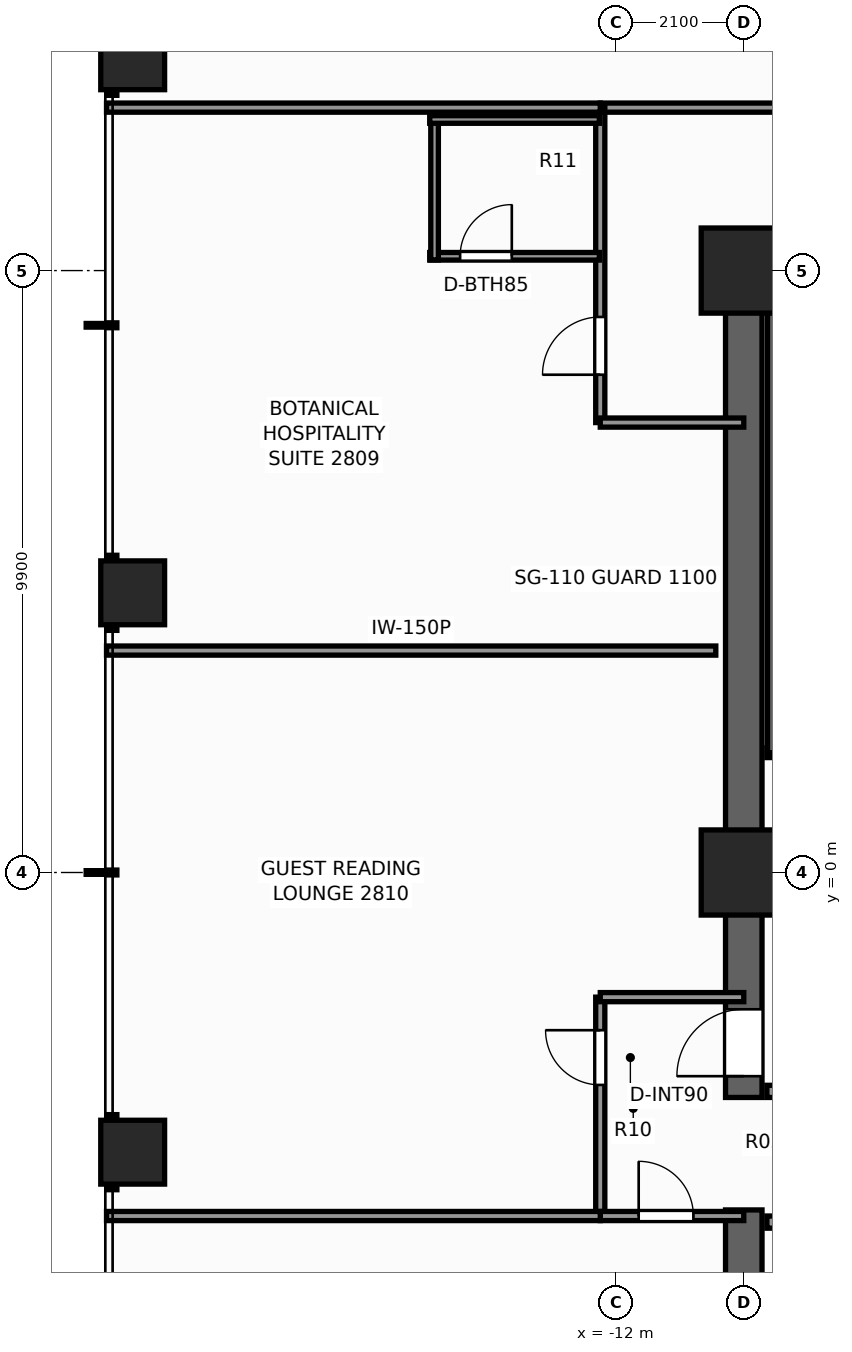
"""IFC4 building model, lengths in metres.
Left out: names, types, materials, properties, quantities, classifications, styles, units other than length and angle.
Written with IfcOpenShell. Run it as: python <this file> out.ifc"""

import sys

from ifc_helpers import new_model, si_unit, direction, frame, frame_2d, origin, origin_2d, place, context, subcontext, project, spatial, rectangle, extrude, element, fill, save


model = new_model("IFC4")
c1 = context("Model", 3, precision=1e-05, world=origin(), true_north=direction((0.0, 1.0)))
c2 = subcontext(c1, "Body", "Model", "MODEL_VIEW")
j1 = project(units=[si_unit("LENGTHUNIT", "METRE"), si_unit("PLANEANGLEUNIT", "RADIAN")], contexts=[c1])
p1 = place(None, origin())
s1 = spatial("IfcSite", under=j1, at=p1, CompositionType="ELEMENT")
p2 = place(p1, origin())
s2 = spatial("IfcBuilding", under=s1, at=p2, CompositionType="ELEMENT")
p3 = place(p2, frame((0.0, 0.0, 98.6)))
s3 = spatial("IfcBuildingStorey", under=s2, at=p3, CompositionType="ELEMENT", Elevation=98.6)
p4 = place(p3, frame((-10.2, 9.9, 0.0), z_axis=(0.0, 0.0, 1.0), x_axis=(1.0, 0.0, 0.0)))
e1 = element("IfcWall", 1, at=p4, inside=s3, PredefinedType="SHEAR", context=c2, shape_type="SweptSolid", body=[
    extrude(rectangle(XDim=14.62, YDim=0.6, at=frame_2d((7.31, 0.0))), origin(), (0.0, 0.0, 1.0), 3.3),
])
p5 = place(p3, frame((-9.9, -9.6, 0.0), z_axis=(0.0, 0.0, 1.0), x_axis=(0.0, 1.0, 0.0)))
e2 = element("IfcWall", 2, at=p5, inside=s3, PredefinedType="SHEAR", context=c2, shape_type="SweptSolid", body=[
    extrude(rectangle(XDim=4.05, YDim=0.6, at=frame_2d((2.025, 0.0))), origin(), (0.0, 0.0, 1.0), 3.3),
])
p6 = place(p3, frame((-9.9, -3.7, 0.0), z_axis=(0.0, 0.0, 1.0), x_axis=(0.0, 1.0, 0.0)))
e3 = element("IfcWall", 3, at=p6, inside=s3, PredefinedType="SHEAR", context=c2, shape_type="SweptSolid", body=[
    extrude(rectangle(XDim=13.3, YDim=0.6, at=frame_2d((6.65, 0.0))), origin(), (0.0, 0.0, 1.0), 3.3),
])
p7 = place(p6, frame((0.35, 0.0, 0.0)))
e4 = element("IfcOpeningElement", 4, at=p7, cuts=e3, PredefinedType="OPENING", context=c2, shape_type="SweptSolid", body=[
    extrude(rectangle(XDim=1.1, YDim=2.2, at=frame_2d((0.55, 1.1))), frame((0.0, 0.31, 0.0), z_axis=(0.0, -1.0, 0.0), x_axis=(1.0, 0.0, 0.0)), (0.0, 0.0, 1.0), 0.62),
])
for number, where, z_axis, x_axis in (
    (5, (-9.9, 9.9, 0.0), (0.0, 0.0, 1.0), (1.0, 0.0, 0.0)),
    (6, (-9.9, 0.0, 0.0), (0.0, 0.0, 1.0), (1.0, 0.0, 0.0)),
):
    element("IfcColumn", number, at=place(p3, frame(where, z_axis=z_axis, x_axis=x_axis)), inside=s3, PredefinedType="COLUMN", context=c2, shape_type="SweptSolid", body=[
        extrude(rectangle(XDim=1.4, YDim=1.4, at=origin_2d()), origin(), (0.0, 0.0, 1.0), 3.3),
    ])
for number, where, z_axis, x_axis in (
    (7, (-19.95, -4.6, 0.0), (0.0, 0.0, 1.0), (1.0, 0.0, 0.0)),
    (8, (-19.95, 4.6, 0.0), (0.0, 0.0, 1.0), (1.0, 0.0, 0.0)),
    (9, (-19.95, 13.4, 0.0), (0.0, 0.0, 1.0), (1.0, 0.0, 0.0)),
):
    element("IfcColumn", number, at=place(p3, frame(where, z_axis=z_axis, x_axis=x_axis)), inside=s3, PredefinedType="COLUMN", context=c2, shape_type="SweptSolid", body=[
        extrude(rectangle(XDim=1.05, YDim=1.05, at=origin_2d()), origin(), (0.0, 0.0, 1.0), 3.3),
    ])
p8 = place(p3, frame((-9.52, 1.97, 0.0), z_axis=(0.0, 0.0, 1.0), x_axis=(1.0, 0.0, 0.0)))
e10 = element("IfcWall", 10, at=p8, inside=s3, PredefinedType="SHEAR", context=c2, shape_type="SweptSolid", body=[
    extrude(rectangle(XDim=3.52, YDim=0.16, at=frame_2d((1.76, 0.0))), origin(), (0.0, 0.0, 1.0), 3.3),
])
p9 = place(p8, frame((1.15, 0.0, 0.0)))
e11 = element("IfcOpeningElement", 11, at=p9, cuts=e10, PredefinedType="OPENING", context=c2, shape_type="SweptSolid", body=[
    extrude(rectangle(XDim=1.1, YDim=2.2, at=frame_2d((0.55, 1.1))), frame((0.0, 0.09, 0.0), z_axis=(0.0, -1.0, 0.0), x_axis=(1.0, 0.0, 0.0)), (0.0, 0.0, 1.0), 0.18),
])
p10 = place(p3, frame((-9.52, 9.53, 0.0), z_axis=(0.0, 0.0, 1.0), x_axis=(1.0, 0.0, 0.0)))
e12 = element("IfcWall", 12, at=p10, inside=s3, PredefinedType="SHEAR", context=c2, shape_type="SweptSolid", body=[
    extrude(rectangle(XDim=3.52, YDim=0.16, at=frame_2d((1.76, 0.0))), origin(), (0.0, 0.0, 1.0), 3.3),
])
p11 = place(p3, frame((-9.43, 1.97, 0.0), z_axis=(0.0, 0.0, 1.0), x_axis=(0.0, 1.0, 0.0)))
e13 = element("IfcWall", 13, at=p11, inside=s3, PredefinedType="SHEAR", context=c2, shape_type="SweptSolid", body=[
    extrude(rectangle(XDim=7.56, YDim=0.16, at=frame_2d((3.78, 0.0))), origin(), (0.0, 0.0, 1.0), 3.3),
])
p12 = place(p3, frame((-9.52, -3.6, 0.0), z_axis=(0.0, 0.0, 1.0), x_axis=(1.0, 0.0, 0.0)))
e14 = element("IfcWall", 14, at=p12, inside=s3, PredefinedType="SOLIDWALL", context=c2, shape_type="SweptSolid", body=[
    extrude(rectangle(XDim=3.77, YDim=0.2, at=frame_2d((1.885, 0.0))), origin(), (0.0, 0.0, 1.0), 3.08),
])
p13 = place(p12, frame((1.15, 0.0, 0.0)))
e15 = element("IfcOpeningElement", 15, at=p13, cuts=e14, PredefinedType="OPENING", context=c2, shape_type="SweptSolid", body=[
    extrude(rectangle(XDim=0.95, YDim=2.06, at=frame_2d((0.475, 1.03))), frame((0.0, 0.11, 0.0), z_axis=(0.0, -1.0, 0.0), x_axis=(1.0, 0.0, 0.0)), (0.0, 0.0, 1.0), 0.22),
])
p14 = place(p3, frame((-9.52, -5.75, 0.0), z_axis=(0.0, 0.0, 1.0), x_axis=(1.0, 0.0, 0.0)))
e16 = element("IfcWall", 16, at=p14, inside=s3, PredefinedType="SOLIDWALL", context=c2, shape_type="SweptSolid", body=[
    extrude(rectangle(XDim=5.66, YDim=0.2, at=frame_2d((2.83, 0.0))), origin(), (0.0, 0.0, 1.0), 3.08),
])
p15 = place(p14, frame((0.55, 0.0, 0.0)))
e17 = element("IfcOpeningElement", 17, at=p15, cuts=e16, PredefinedType="OPENING", context=c2, shape_type="SweptSolid", body=[
    extrude(rectangle(XDim=1.1, YDim=2.2, at=frame_2d((0.55, 1.1))), frame((0.0, 0.11, 0.0), z_axis=(0.0, -1.0, 0.0), x_axis=(1.0, 0.0, 0.0)), (0.0, 0.0, 1.0), 0.22),
])
p16 = place(p14, frame((2.48, 0.0, 0.0)))
e18 = element("IfcOpeningElement", 18, at=p16, cuts=e16, PredefinedType="OPENING", context=c2, shape_type="SweptSolid", body=[
    extrude(rectangle(XDim=1.1, YDim=2.2, at=frame_2d((0.55, 1.1))), frame((0.0, 0.11, 0.0), z_axis=(0.0, -1.0, 0.0), x_axis=(1.0, 0.0, 0.0)), (0.0, 0.0, 1.0), 0.22),
])
p17 = place(p14, frame((4.41, 0.0, 0.0)))
e19 = element("IfcOpeningElement", 19, at=p17, cuts=e16, PredefinedType="OPENING", context=c2, shape_type="SweptSolid", body=[
    extrude(rectangle(XDim=1.1, YDim=2.2, at=frame_2d((0.55, 1.1))), frame((0.0, 0.11, 0.0), z_axis=(0.0, -1.0, 0.0), x_axis=(1.0, 0.0, 0.0)), (0.0, 0.0, 1.0), 0.22),
])
p18 = place(p3, frame((-12.26, 12.58, 0.0), z_axis=(0.0, 0.0, 1.0), x_axis=(1.0, 0.0, 0.0)))
e20 = element("IfcWall", 20, at=p18, inside=s3, PredefinedType="PARTITIONING", context=c2, shape_type="SweptSolid", body=[
    extrude(rectangle(XDim=24.52, YDim=0.15, at=frame_2d((12.26, 0.0))), origin(), (0.0, 0.0, 1.0), 2.292),
])
p19 = place(p18, frame((4.275, 0.0, 0.0)))
e21 = element("IfcOpeningElement", 21, at=p19, cuts=e20, PredefinedType="OPENING", context=c2, shape_type="SweptSolid", body=[
    extrude(rectangle(XDim=0.9, YDim=2.06, at=frame_2d((0.45, 1.03))), frame((0.0, 0.085, 0.0), z_axis=(0.0, -1.0, 0.0), x_axis=(1.0, 0.0, 0.0)), (0.0, 0.0, 1.0), 0.17),
])
p20 = place(p18, frame((13.84, 0.0, 0.0)))
e22 = element("IfcOpeningElement", 22, at=p20, cuts=e20, PredefinedType="OPENING", context=c2, shape_type="SweptSolid", body=[
    extrude(rectangle(XDim=0.9, YDim=2.06, at=frame_2d((0.45, 1.03))), frame((0.0, 0.085, 0.0), z_axis=(0.0, -1.0, 0.0), x_axis=(1.0, 0.0, 0.0)), (0.0, 0.0, 1.0), 0.17),
])
p21 = place(p18, frame((19.345, 0.0, 0.0)))
e23 = element("IfcOpeningElement", 23, at=p21, cuts=e20, PredefinedType="OPENING", context=c2, shape_type="SweptSolid", body=[
    extrude(rectangle(XDim=0.9, YDim=2.06, at=frame_2d((0.45, 1.03))), frame((0.0, 0.085, 0.0), z_axis=(0.0, -1.0, 0.0), x_axis=(1.0, 0.0, 0.0)), (0.0, 0.0, 1.0), 0.17),
])
p22 = place(p3, frame((-12.26, 7.4, 0.0), z_axis=(0.0, 0.0, 1.0), x_axis=(0.0, 1.0, 0.0)))
e24 = element("IfcWall", 24, at=p22, inside=s3, PredefinedType="PARTITIONING", context=c2, shape_type="SweptSolid", body=[
    extrude(rectangle(XDim=5.18, YDim=0.15, at=frame_2d((2.59, 0.0))), origin(), (0.0, 0.0, 1.0), 2.292),
])
p23 = place(p22, frame((0.787, 0.0, 0.0)))
e25 = element("IfcOpeningElement", 25, at=p23, cuts=e24, PredefinedType="OPENING", context=c2, shape_type="SweptSolid", body=[
    extrude(rectangle(XDim=0.95, YDim=2.06, at=frame_2d((0.475, 1.03))), frame((0.0, 0.085, 0.0), z_axis=(0.0, -1.0, 0.0), x_axis=(1.0, 0.0, 0.0)), (0.0, 0.0, 1.0), 0.17),
])
p24 = place(p3, frame((-12.26, 7.4, 0.0), z_axis=(0.0, 0.0, 1.0), x_axis=(1.0, 0.0, 0.0)))
e26 = element("IfcWall", 26, at=p24, inside=s3, PredefinedType="PARTITIONING", context=c2, shape_type="SweptSolid", body=[
    extrude(rectangle(XDim=2.36, YDim=0.15, at=frame_2d((1.18, 0.0))), origin(), (0.0, 0.0, 1.0), 3.08),
])
p25 = place(p3, frame((-12.26, -5.65, 0.0), z_axis=(0.0, 0.0, 1.0), x_axis=(0.0, 1.0, 0.0)))
e27 = element("IfcWall", 27, at=p25, inside=s3, PredefinedType="PARTITIONING", context=c2, shape_type="SweptSolid", body=[
    extrude(rectangle(XDim=3.6, YDim=0.15, at=frame_2d((1.8, 0.0))), origin(), (0.0, 0.0, 1.0), 2.292),
])
p26 = place(p25, frame((2.156, 0.0, 0.0)))
e28 = element("IfcOpeningElement", 28, at=p26, cuts=e27, PredefinedType="OPENING", context=c2, shape_type="SweptSolid", body=[
    extrude(rectangle(XDim=0.9, YDim=2.06, at=frame_2d((0.45, 1.03))), frame((0.0, 0.085, 0.0), z_axis=(0.0, -1.0, 0.0), x_axis=(1.0, 0.0, 0.0)), (0.0, 0.0, 1.0), 0.17),
])
p27 = place(p3, frame((-12.26, -2.05, 0.0), z_axis=(0.0, 0.0, 1.0), x_axis=(1.0, 0.0, 0.0)))
e29 = element("IfcWall", 29, at=p27, inside=s3, PredefinedType="PARTITIONING", context=c2, shape_type="SweptSolid", body=[
    extrude(rectangle(XDim=2.36, YDim=0.15, at=frame_2d((1.18, 0.0))), origin(), (0.0, 0.0, 1.0), 3.08),
])
p28 = place(p3, frame((-12.26, -5.65, 0.0), z_axis=(0.0, 0.0, 1.0), x_axis=(1.0, 0.0, 0.0)))
e30 = element("IfcWall", 30, at=p28, inside=s3, PredefinedType="PARTITIONING", context=c2, shape_type="SweptSolid", body=[
    extrude(rectangle(XDim=2.36, YDim=0.15, at=frame_2d((1.18, 0.0))), origin(), (0.0, 0.0, 1.0), 3.08),
])
p29 = place(p28, frame((0.632, 0.0, 0.0)))
e31 = element("IfcOpeningElement", 31, at=p29, cuts=e30, PredefinedType="OPENING", context=c2, shape_type="SweptSolid", body=[
    extrude(rectangle(XDim=0.9, YDim=2.06, at=frame_2d((0.45, 1.03))), frame((0.0, 0.085, 0.0), z_axis=(0.0, -1.0, 0.0), x_axis=(1.0, 0.0, 0.0)), (0.0, 0.0, 1.0), 0.17),
])
p30 = place(p3, frame((-20.38, 12.58, 0.0), z_axis=(0.0, 0.0, 1.0), x_axis=(1.0, 0.0, 0.0)))
e32 = element("IfcWall", 32, at=p30, inside=s3, PredefinedType="PARTITIONING", context=c2, shape_type="SweptSolid", body=[
    extrude(rectangle(XDim=8.12, YDim=0.15, at=frame_2d((4.06, 0.0))), origin(), (0.0, 0.0, 1.0), 2.292),
])
p31 = place(p3, frame((-20.38, 3.65, 0.0), z_axis=(0.0, 0.0, 1.0), x_axis=(1.0, 0.0, 0.0)))
e33 = element("IfcWall", 33, at=p31, inside=s3, PredefinedType="PARTITIONING", context=c2, shape_type="SweptSolid", body=[
    extrude(rectangle(XDim=10.02, YDim=0.15, at=frame_2d((5.01, 0.0))), origin(), (0.0, 0.0, 1.0), 2.449),
])
p32 = place(p3, frame((-20.38, -5.65, 0.0), z_axis=(0.0, 0.0, 1.0), x_axis=(1.0, 0.0, 0.0)))
e34 = element("IfcWall", 34, at=p32, inside=s3, PredefinedType="PARTITIONING", context=c2, shape_type="SweptSolid", body=[
    extrude(rectangle(XDim=8.12, YDim=0.15, at=frame_2d((4.06, 0.0))), origin(), (0.0, 0.0, 1.0), 2.449),
])
p33 = place(p3, frame((-15.065, 10.135, 0.0), z_axis=(0.0, 0.0, 1.0), x_axis=(1.0, 0.0, 0.0)))
e35 = element("IfcWall", 35, at=p33, inside=s3, PredefinedType="PARTITIONING", context=c2, shape_type="SweptSolid", body=[
    extrude(rectangle(XDim=2.79, YDim=0.125, at=frame_2d((1.395, 0.0))), origin(), (0.0, 0.0, 1.0), 3.08),
])
p34 = place(p33, frame((0.5, 0.0, 0.0)))
e36 = element("IfcOpeningElement", 36, at=p34, cuts=e35, PredefinedType="OPENING", context=c2, shape_type="SweptSolid", body=[
    extrude(rectangle(XDim=0.85, YDim=2.03, at=frame_2d((0.425, 1.015))), frame((0.0, 0.073, 0.0), z_axis=(0.0, -1.0, 0.0), x_axis=(1.0, 0.0, 0.0)), (0.0, 0.0, 1.0), 0.145),
])
p35 = place(p3, frame((-14.985, 10.075, 0.0), z_axis=(0.0, 0.0, 1.0), x_axis=(0.0, 1.0, 0.0)))
e37 = element("IfcWall", 37, at=p35, inside=s3, PredefinedType="PARTITIONING", context=c2, shape_type="SweptSolid", body=[
    extrude(rectangle(XDim=2.37, YDim=0.125, at=frame_2d((1.185, 0.0))), origin(), (0.0, 0.0, 1.0), 2.292),
])
p36 = place(p3, frame((-15.065, 12.385, 0.0), z_axis=(0.0, 0.0, 1.0), x_axis=(1.0, 0.0, 0.0)))
e38 = element("IfcWall", 38, at=p36, inside=s3, PredefinedType="PARTITIONING", context=c2, shape_type="SweptSolid", body=[
    extrude(rectangle(XDim=2.79, YDim=0.125, at=frame_2d((1.395, 0.0))), origin(), (0.0, 0.0, 1.0), 3.08),
])
p37 = place(p7, origin())
e39 = element("IfcDoor", 39, at=p37, inside=s3, OperationType="SINGLE_SWING_LEFT", PredefinedType="DOOR", context=c2, shape_type="SweptSolid", body=[
    extrude(rectangle(XDim=1.1, YDim=2.2, at=frame_2d((0.55, 1.1))), frame((0.0, 0.025, 0.0), z_axis=(0.0, -1.0, 0.0), x_axis=(1.0, 0.0, 0.0)), (0.0, 0.0, 1.0), 0.05),
])
fill(e4, e39)
p38 = place(p34, origin())
e40 = element("IfcDoor", 40, at=p38, inside=s3, OperationType="SINGLE_SWING_RIGHT", PredefinedType="DOOR", context=c2, shape_type="SweptSolid", body=[
    extrude(rectangle(XDim=0.85, YDim=2.03, at=frame_2d((0.425, 1.015))), frame((0.0, 0.025, 0.0), z_axis=(0.0, -1.0, 0.0), x_axis=(1.0, 0.0, 0.0)), (0.0, 0.0, 1.0), 0.05),
])
fill(e36, e40)
p39 = place(p23, origin())
e41 = element("IfcDoor", 41, at=p39, inside=s3, OperationType="SINGLE_SWING_LEFT", PredefinedType="DOOR", context=c2, shape_type="SweptSolid", body=[
    extrude(rectangle(XDim=0.95, YDim=2.06, at=frame_2d((0.475, 1.03))), frame((0.0, 0.025, 0.0), z_axis=(0.0, -1.0, 0.0), x_axis=(1.0, 0.0, 0.0)), (0.0, 0.0, 1.0), 0.05),
])
fill(e25, e41)
p40 = place(p26, origin())
e42 = element("IfcDoor", 42, at=p40, inside=s3, OperationType="SINGLE_SWING_RIGHT", PredefinedType="DOOR", context=c2, shape_type="SweptSolid", body=[
    extrude(rectangle(XDim=0.9, YDim=2.06, at=frame_2d((0.45, 1.03))), frame((0.0, 0.025, 0.0), z_axis=(0.0, -1.0, 0.0), x_axis=(1.0, 0.0, 0.0)), (0.0, 0.0, 1.0), 0.05),
])
fill(e28, e42)
p41 = place(p29, origin())
e43 = element("IfcDoor", 43, at=p41, inside=s3, OperationType="SINGLE_SWING_LEFT", PredefinedType="DOOR", context=c2, shape_type="SweptSolid", body=[
    extrude(rectangle(XDim=0.9, YDim=2.06, at=frame_2d((0.45, 1.03))), frame((0.0, 0.025, 0.0), z_axis=(0.0, -1.0, 0.0), x_axis=(1.0, 0.0, 0.0)), (0.0, 0.0, 1.0), 0.05),
])
fill(e31, e43)
save(model, sys.argv[1])
